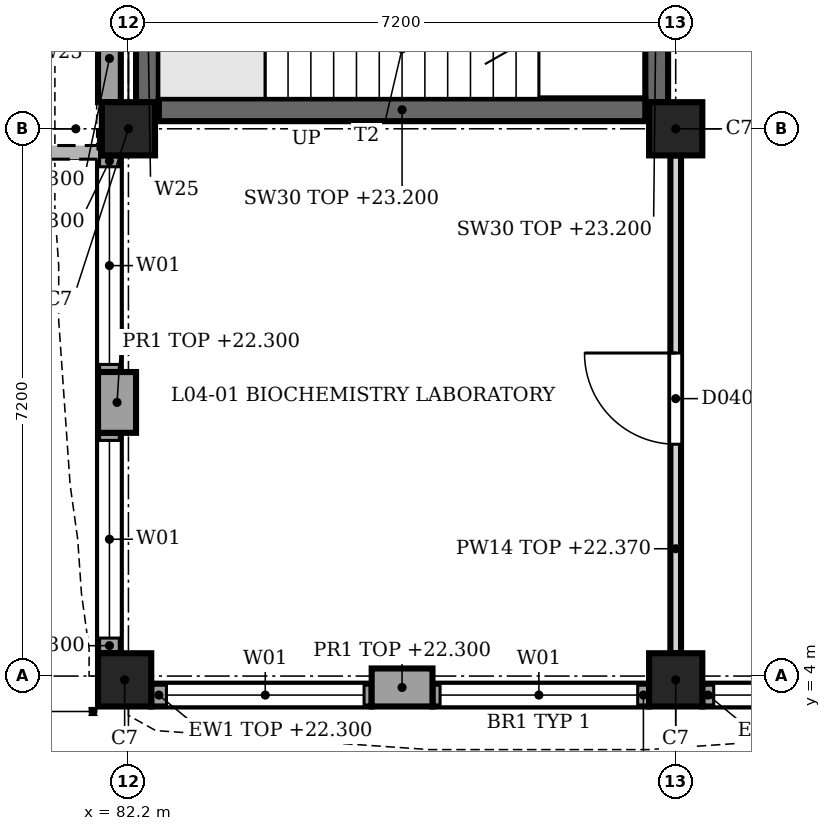
"""IFC4 building model, lengths in metres.
Left out: names, types, materials, properties, quantities, classifications, styles, units other than length and angle.
Written with IfcOpenShell. Run it as: python <this file> out.ifc"""

import sys

from ifc_helpers import new_model, si_unit, direction, frame, frame_2d, origin, origin_2d, place, context, subcontext, project, spatial, rectangle, extrude, element, fill, save


model = new_model("IFC4")
c1 = context("Model", 3, precision=1e-05, world=origin(), true_north=direction((0.0, 1.0)))
c2 = subcontext(c1, "Body", "Model", "MODEL_VIEW")
j1 = project(units=[si_unit("LENGTHUNIT", "METRE"), si_unit("PLANEANGLEUNIT", "RADIAN")], contexts=[c1])
p1 = place(None, origin())
s1 = spatial("IfcSite", under=j1, at=p1, CompositionType="ELEMENT")
p2 = place(p1, origin())
s2 = spatial("IfcBuilding", under=s1, at=p2, CompositionType="ELEMENT")
p3 = place(p2, frame((0.0, 0.0, 18.9)))
s3 = spatial("IfcBuildingStorey", under=s2, at=p3, CompositionType="ELEMENT", Elevation=18.9)
for number, where, z_axis, x_axis in (
    (1, (82.15, 3.95, 0.0), (0.0, 0.0, 1.0), (1.0, 0.0, 0.0)),
    (2, (82.2, 11.2, 0.0), (0.0, 0.0, 1.0), (1.0, 0.0, 0.0)),
    (3, (89.4, 3.95, 0.0), (0.0, 0.0, 1.0), (1.0, 0.0, 0.0)),
    (4, (89.4, 11.2, 0.0), (0.0, 0.0, 1.0), (1.0, 0.0, 0.0)),
):
    element("IfcColumn", number, at=place(p3, frame(where, z_axis=z_axis, x_axis=x_axis)), inside=s3, PredefinedType="COLUMN", context=c2, shape_type="SweptSolid", body=[
        extrude(rectangle(XDim=0.7, YDim=0.7, at=origin_2d()), origin(), (0.0, 0.0, 1.0), 4.5),
    ])
p4 = place(p3, frame((86.2, 3.85, 0.0), z_axis=(0.0, 0.0, 1.0), x_axis=(-1.0, 0.0, 0.0)))
e5 = element("IfcWall", 5, at=p4, inside=s3, PredefinedType="SOLIDWALL", context=c2, shape_type="SweptSolid", body=[
    extrude(rectangle(XDim=0.8, YDim=0.5, at=frame_2d((0.4, 0.0))), origin(), (0.0, 0.0, 1.0), 3.4),
])
p5 = place(p3, frame((92.6, 3.75, 0.0), z_axis=(0.0, 0.0, 1.0), x_axis=(-1.0, 0.0, 0.0)))
e6 = element("IfcWall", 6, at=p5, inside=s3, PredefinedType="SOLIDWALL", context=c2, shape_type="SweptSolid", body=[
    extrude(rectangle(XDim=2.85, YDim=0.3, at=frame_2d((1.425, 0.0))), origin(), (0.0, 0.0, 1.0), 3.4),
])
p6 = place(p5, frame((0.1, 0.0, 0.9)))
e7 = element("IfcOpeningElement", 7, at=p6, cuts=e6, PredefinedType="OPENING", context=c2, shape_type="SweptSolid", body=[
    extrude(rectangle(XDim=2.6, YDim=2.4, at=frame_2d((1.3, 1.2))), frame((0.0, 0.16, 0.0), z_axis=(0.0, -1.0, 0.0), x_axis=(1.0, 0.0, 0.0)), (0.0, 0.0, 1.0), 0.32),
])
p7 = place(p3, frame((89.05, 3.75, 0.0), z_axis=(0.0, 0.0, 1.0), x_axis=(-1.0, 0.0, 0.0)))
e8 = element("IfcWall", 8, at=p7, inside=s3, PredefinedType="SOLIDWALL", context=c2, shape_type="SweptSolid", body=[
    extrude(rectangle(XDim=2.85, YDim=0.3, at=frame_2d((1.425, 0.0))), origin(), (0.0, 0.0, 1.0), 3.4),
])
p8 = place(p7, frame((0.15, 0.0, 0.9)))
e9 = element("IfcOpeningElement", 9, at=p8, cuts=e8, PredefinedType="OPENING", context=c2, shape_type="SweptSolid", body=[
    extrude(rectangle(XDim=2.6, YDim=2.4, at=frame_2d((1.3, 1.2))), frame((0.0, 0.16, 0.0), z_axis=(0.0, -1.0, 0.0), x_axis=(1.0, 0.0, 0.0)), (0.0, 0.0, 1.0), 0.32),
])
p9 = place(p3, frame((85.4, 3.75, 0.0), z_axis=(0.0, 0.0, 1.0), x_axis=(-1.0, 0.0, 0.0)))
e10 = element("IfcWall", 10, at=p9, inside=s3, PredefinedType="SOLIDWALL", context=c2, shape_type="SweptSolid", body=[
    extrude(rectangle(XDim=2.9, YDim=0.3, at=frame_2d((1.45, 0.0))), origin(), (0.0, 0.0, 1.0), 3.4),
])
p10 = place(p9, frame((0.1, 0.0, 0.9)))
e11 = element("IfcOpeningElement", 11, at=p10, cuts=e10, PredefinedType="OPENING", context=c2, shape_type="SweptSolid", body=[
    extrude(rectangle(XDim=2.6, YDim=2.4, at=frame_2d((1.3, 1.2))), frame((0.0, 0.16, 0.0), z_axis=(0.0, -1.0, 0.0), x_axis=(1.0, 0.0, 0.0)), (0.0, 0.0, 1.0), 0.32),
])
p11 = place(p3, frame((82.05, 7.2, 0.0), z_axis=(0.0, 0.0, 1.0), x_axis=(0.0, 1.0, 0.0)))
e12 = element("IfcWall", 12, at=p11, inside=s3, PredefinedType="SOLIDWALL", context=c2, shape_type="SweptSolid", body=[
    extrude(rectangle(XDim=0.8, YDim=0.5, at=frame_2d((0.4, 0.0))), origin(), (0.0, 0.0, 1.0), 3.4),
])
p12 = place(p3, frame((81.95, 4.3, 0.0), z_axis=(0.0, 0.0, 1.0), x_axis=(0.0, 1.0, 0.0)))
e13 = element("IfcWall", 13, at=p12, inside=s3, PredefinedType="SOLIDWALL", context=c2, shape_type="SweptSolid", body=[
    extrude(rectangle(XDim=2.9, YDim=0.3, at=frame_2d((1.45, 0.0))), origin(), (0.0, 0.0, 1.0), 3.4),
])
p13 = place(p12, frame((0.2, 0.0, 0.9)))
e14 = element("IfcOpeningElement", 14, at=p13, cuts=e13, PredefinedType="OPENING", context=c2, shape_type="SweptSolid", body=[
    extrude(rectangle(XDim=2.6, YDim=2.4, at=frame_2d((1.3, 1.2))), frame((0.0, 0.16, 0.0), z_axis=(0.0, -1.0, 0.0), x_axis=(1.0, 0.0, 0.0)), (0.0, 0.0, 1.0), 0.32),
])
p14 = place(p3, frame((81.95, 8.0, 0.0), z_axis=(0.0, 0.0, 1.0), x_axis=(0.0, 1.0, 0.0)))
e15 = element("IfcWall", 15, at=p14, inside=s3, PredefinedType="SOLIDWALL", context=c2, shape_type="SweptSolid", body=[
    extrude(rectangle(XDim=2.85, YDim=0.3, at=frame_2d((1.425, 0.0))), origin(), (0.0, 0.0, 1.0), 3.4),
])
p15 = place(p14, frame((0.1, 0.0, 0.9)))
e16 = element("IfcOpeningElement", 16, at=p15, cuts=e15, PredefinedType="OPENING", context=c2, shape_type="SweptSolid", body=[
    extrude(rectangle(XDim=2.6, YDim=2.4, at=frame_2d((1.3, 1.2))), frame((0.0, 0.16, 0.0), z_axis=(0.0, -1.0, 0.0), x_axis=(1.0, 0.0, 0.0)), (0.0, 0.0, 1.0), 0.32),
])
p16 = place(p3, frame((81.95, 11.55, 0.0), z_axis=(0.0, 0.0, 1.0), x_axis=(0.0, 1.0, 0.0)))
e17 = element("IfcWall", 17, at=p16, inside=s3, PredefinedType="SOLIDWALL", context=c2, shape_type="SweptSolid", body=[
    extrude(rectangle(XDim=2.85, YDim=0.3, at=frame_2d((1.425, 0.0))), origin(), (0.0, 0.0, 1.0), 3.4),
])
p17 = place(p16, frame((1.15, 0.0, 1.2)))
e18 = element("IfcOpeningElement", 18, at=p17, cuts=e17, PredefinedType="OPENING", context=c2, shape_type="SweptSolid", body=[
    extrude(rectangle(XDim=0.6, YDim=1.8, at=frame_2d((0.3, 0.9))), frame((0.0, 0.16, 0.0), z_axis=(0.0, -1.0, 0.0), x_axis=(1.0, 0.0, 0.0)), (0.0, 0.0, 1.0), 0.32),
])
p18 = place(p3, frame((64.6, 10.89, 0.0), z_axis=(0.0, 0.0, 1.0), x_axis=(1.0, 0.0, 0.0)))
e19 = element("IfcWall", 19, at=p18, inside=s3, PredefinedType="PARAPET", context=c2, shape_type="SweptSolid", body=[
    extrude(rectangle(XDim=17.2, YDim=0.18, at=frame_2d((8.6, 0.0))), origin(), (0.0, 0.0, 1.0), 1.0),
])
p19 = place(p3, frame((89.15, 11.55, 0.0), z_axis=(0.0, 0.0, 1.0), x_axis=(0.0, 1.0, 0.0)))
e20 = element("IfcWall", 20, at=p19, inside=s3, PredefinedType="SHEAR", context=c2, shape_type="SweptSolid", body=[
    extrude(rectangle(XDim=6.5, YDim=0.3, at=frame_2d((3.25, 0.0))), origin(), (0.0, 0.0, 1.0), 4.3),
])
p20 = place(p19, frame((4.25, 0.0, 0.0)))
e21 = element("IfcOpeningElement", 21, at=p20, cuts=e20, PredefinedType="OPENING", context=c2, shape_type="SweptSolid", body=[
    extrude(rectangle(XDim=1.2, YDim=2.1, at=frame_2d((0.6, 1.05))), frame((0.0, 0.16, 0.0), z_axis=(0.0, -1.0, 0.0), x_axis=(1.0, 0.0, 0.0)), (0.0, 0.0, 1.0), 0.32),
])
p21 = place(p3, frame((82.45, 11.55, 0.0), z_axis=(0.0, 0.0, 1.0), x_axis=(0.0, 1.0, 0.0)))
e22 = element("IfcWall", 22, at=p21, inside=s3, PredefinedType="SHEAR", context=c2, shape_type="SweptSolid", body=[
    extrude(rectangle(XDim=6.5, YDim=0.3, at=frame_2d((3.25, 0.0))), origin(), (0.0, 0.0, 1.0), 4.3),
])
p22 = place(p21, frame((1.15, 0.0, 1.2)))
e23 = element("IfcOpeningElement", 23, at=p22, cuts=e22, PredefinedType="OPENING", context=c2, shape_type="SweptSolid", body=[
    extrude(rectangle(XDim=0.6, YDim=1.8, at=frame_2d((0.3, 0.9))), frame((0.0, 0.16, 0.0), z_axis=(0.0, -1.0, 0.0), x_axis=(1.0, 0.0, 0.0)), (0.0, 0.0, 1.0), 0.32),
])
p23 = place(p3, frame((82.6, 11.45, 0.0), z_axis=(0.0, 0.0, 1.0), x_axis=(1.0, 0.0, 0.0)))
e24 = element("IfcWall", 24, at=p23, inside=s3, PredefinedType="SHEAR", context=c2, shape_type="SweptSolid", body=[
    extrude(rectangle(XDim=6.4, YDim=0.3, at=frame_2d((3.2, 0.0))), origin(), (0.0, 0.0, 1.0), 4.3),
])
p24 = place(p3, frame((89.4, 4.3, 0.0), z_axis=(0.0, 0.0, 1.0), x_axis=(0.0, 1.0, 0.0)))
e25 = element("IfcWall", 25, at=p24, inside=s3, PredefinedType="PARTITIONING", context=c2, shape_type="SweptSolid", body=[
    extrude(rectangle(XDim=6.55, YDim=0.14, at=frame_2d((3.275, 0.0))), origin(), (0.0, 0.0, 1.0), 3.47),
])
p25 = place(p24, frame((2.75, 0.0, 0.0)))
e26 = element("IfcOpeningElement", 26, at=p25, cuts=e25, PredefinedType="OPENING", context=c2, shape_type="SweptSolid", body=[
    extrude(rectangle(XDim=1.2, YDim=2.1, at=frame_2d((0.6, 1.05))), frame((0.0, 0.08, 0.0), z_axis=(0.0, -1.0, 0.0), x_axis=(1.0, 0.0, 0.0)), (0.0, 0.0, 1.0), 0.16),
])
p26 = place(p6, origin())
e27 = element("IfcWindow", 27, at=p26, inside=s3, PartitioningType="SINGLE_PANEL", PredefinedType="WINDOW", context=c2, shape_type="SweptSolid", body=[
    extrude(rectangle(XDim=2.6, YDim=2.4, at=frame_2d((1.3, 1.2))), frame((0.0, 0.03, 0.0), z_axis=(0.0, -1.0, 0.0), x_axis=(1.0, 0.0, 0.0)), (0.0, 0.0, 1.0), 0.06),
])
fill(e7, e27)
p27 = place(p8, origin())
e28 = element("IfcWindow", 28, at=p27, inside=s3, PartitioningType="SINGLE_PANEL", PredefinedType="WINDOW", context=c2, shape_type="SweptSolid", body=[
    extrude(rectangle(XDim=2.6, YDim=2.4, at=frame_2d((1.3, 1.2))), frame((0.0, 0.03, 0.0), z_axis=(0.0, -1.0, 0.0), x_axis=(1.0, 0.0, 0.0)), (0.0, 0.0, 1.0), 0.06),
])
fill(e9, e28)
p28 = place(p10, origin())
e29 = element("IfcWindow", 29, at=p28, inside=s3, PartitioningType="SINGLE_PANEL", PredefinedType="WINDOW", context=c2, shape_type="SweptSolid", body=[
    extrude(rectangle(XDim=2.6, YDim=2.4, at=frame_2d((1.3, 1.2))), frame((0.0, 0.03, 0.0), z_axis=(0.0, -1.0, 0.0), x_axis=(1.0, 0.0, 0.0)), (0.0, 0.0, 1.0), 0.06),
])
fill(e11, e29)
p29 = place(p13, origin())
e30 = element("IfcWindow", 30, at=p29, inside=s3, PartitioningType="SINGLE_PANEL", PredefinedType="WINDOW", context=c2, shape_type="SweptSolid", body=[
    extrude(rectangle(XDim=2.6, YDim=2.4, at=frame_2d((1.3, 1.2))), frame((0.0, 0.03, 0.0), z_axis=(0.0, -1.0, 0.0), x_axis=(1.0, 0.0, 0.0)), (0.0, 0.0, 1.0), 0.06),
])
fill(e14, e30)
p30 = place(p15, origin())
e31 = element("IfcWindow", 31, at=p30, inside=s3, PartitioningType="SINGLE_PANEL", PredefinedType="WINDOW", context=c2, shape_type="SweptSolid", body=[
    extrude(rectangle(XDim=2.6, YDim=2.4, at=frame_2d((1.3, 1.2))), frame((0.0, 0.03, 0.0), z_axis=(0.0, -1.0, 0.0), x_axis=(1.0, 0.0, 0.0)), (0.0, 0.0, 1.0), 0.06),
])
fill(e16, e31)
p31 = place(p25, origin())
e32 = element("IfcDoor", 32, at=p31, inside=s3, OperationType="SINGLE_SWING_RIGHT", PredefinedType="DOOR", context=c2, shape_type="SweptSolid", body=[
    extrude(rectangle(XDim=1.2, YDim=2.1, at=frame_2d((0.6, 1.05))), frame((0.0, 0.025, 0.0), z_axis=(0.0, -1.0, 0.0), x_axis=(1.0, 0.0, 0.0)), (0.0, 0.0, 1.0), 0.05),
])
fill(e26, e32)
save(model, sys.argv[1])
